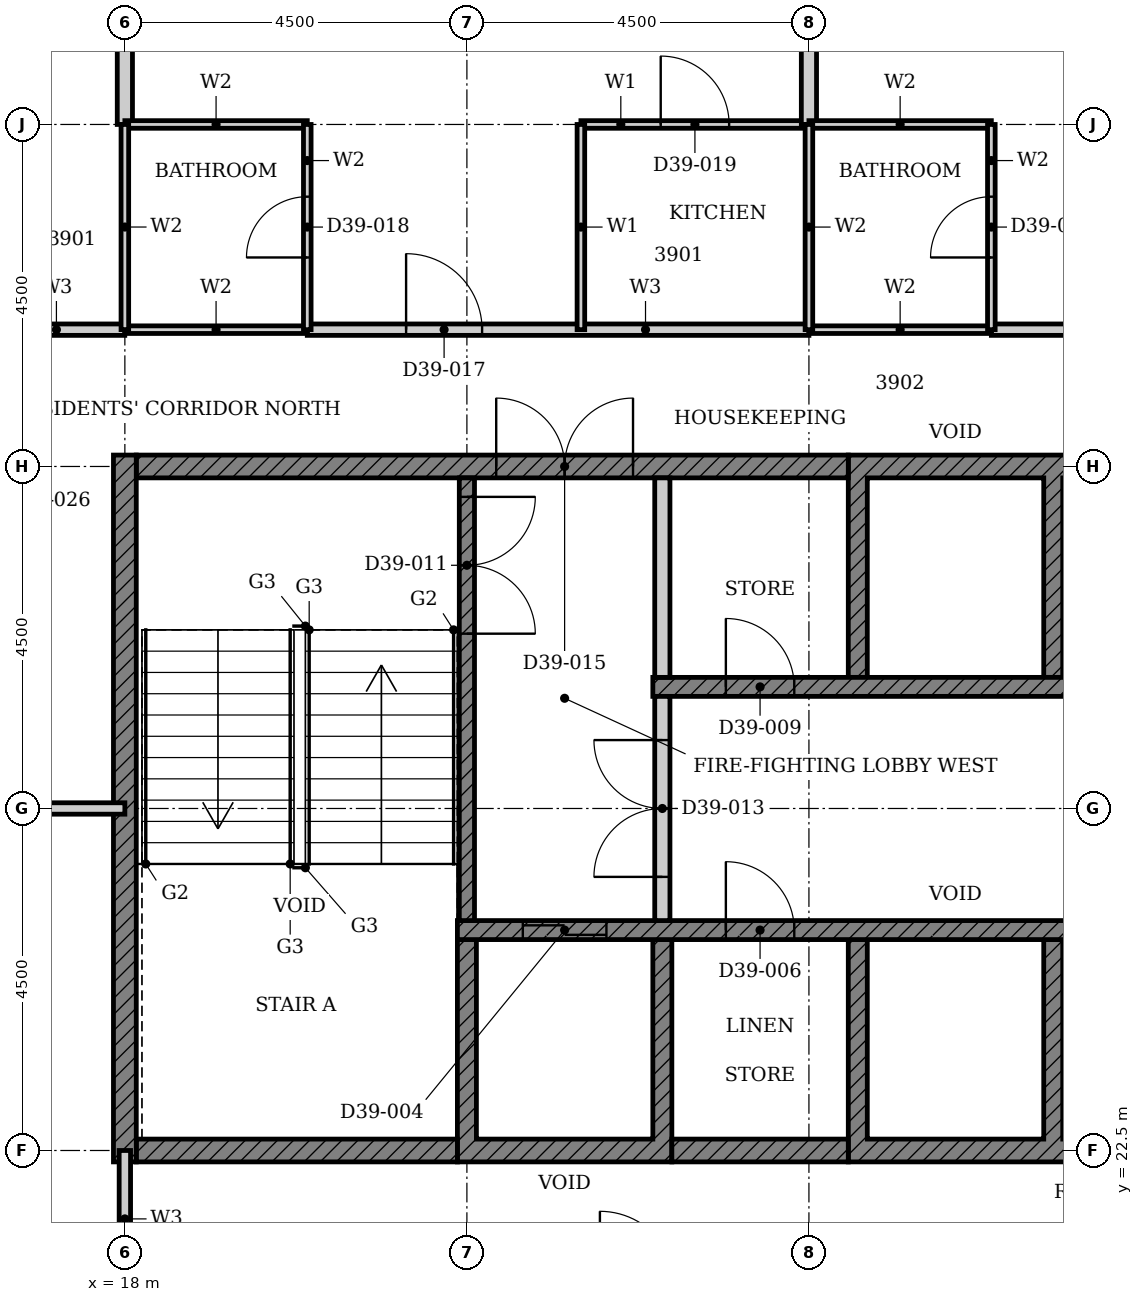
"""IFC4 building model, lengths in metres.
Left out: names, types, materials, properties, quantities, classifications, styles, units other than length and angle.
Written with IfcOpenShell. Run it as: python <this file> out.ifc"""

import sys

from ifc_helpers import new_model, si_unit, direction, frame, frame_2d, origin, place, context, subcontext, project, spatial, polyline, rectangle, outline, extrude, element, fill, save


model = new_model("IFC4")
c1 = context("Model", 3, precision=1e-05, world=origin(), true_north=direction((0.0, 1.0)))
c2 = subcontext(c1, "Body", "Model", "MODEL_VIEW")
j1 = project(units=[si_unit("LENGTHUNIT", "METRE"), si_unit("PLANEANGLEUNIT", "RADIAN")], contexts=[c1])
p1 = place(None, origin())
s1 = spatial("IfcSite", under=j1, at=p1, CompositionType="ELEMENT")
p2 = place(p1, origin())
s2 = spatial("IfcBuilding", under=s1, at=p2, CompositionType="ELEMENT")
p3 = place(p2, frame((0.0, 0.0, 158.0)))
s3 = spatial("IfcBuildingStorey", under=s2, at=p3, CompositionType="ELEMENT", Elevation=158.0)
p4 = place(p3, origin())
e1 = element("IfcWall", 1, at=p4, inside=s3, PredefinedType="SHEAR", context=c2, shape_type="SweptSolid", body=[
    extrude(outline(polyline([(22.375, 22.35), (25.197, 22.35), (25.197, 25.275), (24.947, 25.275), (24.947, 22.65), (22.625, 22.65), (22.625, 25.275), (22.375, 25.275), (22.375, 22.35)])), origin(), (0.0, 0.0, 1.0), 3.4),
])
p5 = place(p3, origin())
e2 = element("IfcWall", 2, at=p5, inside=s3, PredefinedType="SHEAR", context=c2, shape_type="SweptSolid", body=[
    extrude(outline(polyline([(27.518, 22.35), (32.911, 22.35), (32.911, 25.275), (32.661, 25.275), (32.661, 22.65), (30.339, 22.65), (30.339, 25.275), (30.089, 25.275), (30.089, 22.65), (27.768, 22.65), (27.768, 25.275), (27.518, 25.275), (27.518, 22.35)])), origin(), (0.0, 0.0, 1.0), 3.4),
])
p6 = place(p3, origin())
e3 = element("IfcWall", 3, at=p6, inside=s3, PredefinedType="SHEAR", context=c2, shape_type="SweptSolid", body=[
    extrude(outline(polyline([(27.518, 28.725), (27.768, 28.725), (27.768, 31.35), (30.089, 31.35), (30.089, 28.725), (30.339, 28.725), (30.339, 31.35), (32.661, 31.35), (32.661, 28.725), (32.911, 28.725), (32.911, 31.65), (27.518, 31.65), (27.518, 28.725)])), origin(), (0.0, 0.0, 1.0), 3.4),
])
p7 = place(p3, frame((18.15, 22.5, 0.0), z_axis=(0.0, 0.0, 1.0), x_axis=(1.0, 0.0, 0.0)))
e4 = element("IfcWall", 4, at=p7, inside=s3, PredefinedType="SHEAR", context=c2, shape_type="SweptSolid", body=[
    extrude(rectangle(XDim=4.225, YDim=0.3, at=frame_2d((2.113, 0.0))), origin(), (0.0, 0.0, 1.0), 3.4),
])
p8 = place(p3, frame((25.197, 22.5, 0.0), z_axis=(0.0, 0.0, 1.0), x_axis=(1.0, 0.0, 0.0)))
e5 = element("IfcWall", 5, at=p8, inside=s3, PredefinedType="SHEAR", context=c2, shape_type="SweptSolid", body=[
    extrude(rectangle(XDim=2.321, YDim=0.3, at=frame_2d((1.161, 0.0))), origin(), (0.0, 0.0, 1.0), 3.4),
])
p9 = place(p3, frame((18.15, 31.5, 0.0), z_axis=(0.0, 0.0, 1.0), x_axis=(1.0, 0.0, 0.0)))
e6 = element("IfcWall", 6, at=p9, inside=s3, PredefinedType="SHEAR", context=c2, shape_type="SweptSolid", body=[
    extrude(rectangle(XDim=9.368, YDim=0.3, at=frame_2d((4.684, 0.0))), origin(), (0.0, 0.0, 1.0), 3.4),
])
p10 = place(p9, frame((4.736, 0.0, 0.0)))
e7 = element("IfcOpeningElement", 7, at=p10, cuts=e6, PredefinedType="OPENING", context=c2, shape_type="SweptSolid", body=[
    extrude(rectangle(XDim=1.8, YDim=2.1, at=frame_2d((0.9, 1.05))), frame((0.0, 0.16, 0.0), z_axis=(0.0, -1.0, 0.0), x_axis=(1.0, 0.0, 0.0)), (0.0, 0.0, 1.0), 0.32),
])
p11 = place(p3, frame((18.0, 22.35, 0.0), z_axis=(0.0, 0.0, 1.0), x_axis=(0.0, 1.0, 0.0)))
e8 = element("IfcWall", 8, at=p11, inside=s3, PredefinedType="SHEAR", context=c2, shape_type="SweptSolid", body=[
    extrude(rectangle(XDim=9.3, YDim=0.3, at=frame_2d((4.65, 0.0))), origin(), (0.0, 0.0, 1.0), 3.4),
])
p12 = place(p3, frame((22.375, 25.4, 0.0), z_axis=(0.0, 0.0, 1.0), x_axis=(1.0, 0.0, 0.0)))
e9 = element("IfcWall", 9, at=p12, inside=s3, PredefinedType="SHEAR", context=c2, shape_type="SweptSolid", body=[
    extrude(rectangle(XDim=15.678, YDim=0.25, at=frame_2d((7.839, 0.0))), origin(), (0.0, 0.0, 1.0), 3.4),
])
p13 = place(p12, frame((8.575, 0.0, 0.0)))
e10 = element("IfcOpeningElement", 10, at=p13, cuts=e9, PredefinedType="OPENING", context=c2, shape_type="SweptSolid", body=[
    extrude(rectangle(XDim=1.1, YDim=2.1, at=frame_2d((0.55, 1.05))), frame((0.0, 0.135, 0.0), z_axis=(0.0, -1.0, 0.0), x_axis=(1.0, 0.0, 0.0)), (0.0, 0.0, 1.0), 0.27),
])
p14 = place(p12, frame((0.861, 0.0, 0.0)))
e11 = element("IfcOpeningElement", 11, at=p14, cuts=e9, PredefinedType="OPENING", context=c2, shape_type="SweptSolid", body=[
    extrude(rectangle(XDim=1.1, YDim=2.1, at=frame_2d((0.55, 1.05))), frame((0.0, 0.135, 0.0), z_axis=(0.0, -1.0, 0.0), x_axis=(1.0, 0.0, 0.0)), (0.0, 0.0, 1.0), 0.27),
])
p15 = place(p12, frame((3.532, 0.0, 0.0)))
e12 = element("IfcOpeningElement", 12, at=p15, cuts=e9, PredefinedType="OPENING", context=c2, shape_type="SweptSolid", body=[
    extrude(rectangle(XDim=0.9, YDim=2.1, at=frame_2d((0.45, 1.05))), frame((0.0, 0.135, 0.0), z_axis=(0.0, -1.0, 0.0), x_axis=(1.0, 0.0, 0.0)), (0.0, 0.0, 1.0), 0.27),
])
p16 = place(p12, frame((11.246, 0.0, 0.0)))
e13 = element("IfcOpeningElement", 13, at=p16, cuts=e9, PredefinedType="OPENING", context=c2, shape_type="SweptSolid", body=[
    extrude(rectangle(XDim=0.9, YDim=2.1, at=frame_2d((0.45, 1.05))), frame((0.0, 0.135, 0.0), z_axis=(0.0, -1.0, 0.0), x_axis=(1.0, 0.0, 0.0)), (0.0, 0.0, 1.0), 0.27),
])
p17 = place(p12, frame((13.818, 0.0, 0.0)))
e14 = element("IfcOpeningElement", 14, at=p17, cuts=e9, PredefinedType="OPENING", context=c2, shape_type="SweptSolid", body=[
    extrude(rectangle(XDim=0.9, YDim=2.1, at=frame_2d((0.45, 1.05))), frame((0.0, 0.135, 0.0), z_axis=(0.0, -1.0, 0.0), x_axis=(1.0, 0.0, 0.0)), (0.0, 0.0, 1.0), 0.27),
])
p18 = place(p3, frame((24.947, 28.6, 0.0), z_axis=(0.0, 0.0, 1.0), x_axis=(1.0, 0.0, 0.0)))
e15 = element("IfcWall", 15, at=p18, inside=s3, PredefinedType="SHEAR", context=c2, shape_type="SweptSolid", body=[
    extrude(rectangle(XDim=15.678, YDim=0.25, at=frame_2d((7.839, 0.0))), origin(), (0.0, 0.0, 1.0), 3.4),
])
p19 = place(p18, frame((6.004, 0.0, 0.0)))
e16 = element("IfcOpeningElement", 16, at=p19, cuts=e15, PredefinedType="OPENING", context=c2, shape_type="SweptSolid", body=[
    extrude(rectangle(XDim=1.1, YDim=2.1, at=frame_2d((0.55, 1.05))), frame((0.0, 0.135, 0.0), z_axis=(0.0, -1.0, 0.0), x_axis=(1.0, 0.0, 0.0)), (0.0, 0.0, 1.0), 0.27),
])
p20 = place(p18, frame((11.146, 0.0, 0.0)))
e17 = element("IfcOpeningElement", 17, at=p20, cuts=e15, PredefinedType="OPENING", context=c2, shape_type="SweptSolid", body=[
    extrude(rectangle(XDim=1.1, YDim=2.1, at=frame_2d((0.55, 1.05))), frame((0.0, 0.135, 0.0), z_axis=(0.0, -1.0, 0.0), x_axis=(1.0, 0.0, 0.0)), (0.0, 0.0, 1.0), 0.27),
])
p21 = place(p18, frame((13.718, 0.0, 0.0)))
e18 = element("IfcOpeningElement", 18, at=p21, cuts=e15, PredefinedType="OPENING", context=c2, shape_type="SweptSolid", body=[
    extrude(rectangle(XDim=1.1, YDim=2.1, at=frame_2d((0.55, 1.05))), frame((0.0, 0.135, 0.0), z_axis=(0.0, -1.0, 0.0), x_axis=(1.0, 0.0, 0.0)), (0.0, 0.0, 1.0), 0.27),
])
p22 = place(p18, frame((0.961, 0.0, 0.0)))
e19 = element("IfcOpeningElement", 19, at=p22, cuts=e15, PredefinedType="OPENING", context=c2, shape_type="SweptSolid", body=[
    extrude(rectangle(XDim=0.9, YDim=2.1, at=frame_2d((0.45, 1.05))), frame((0.0, 0.135, 0.0), z_axis=(0.0, -1.0, 0.0), x_axis=(1.0, 0.0, 0.0)), (0.0, 0.0, 1.0), 0.27),
])
p23 = place(p18, frame((8.675, 0.0, 0.0)))
e20 = element("IfcOpeningElement", 20, at=p23, cuts=e15, PredefinedType="OPENING", context=c2, shape_type="SweptSolid", body=[
    extrude(rectangle(XDim=0.9, YDim=2.1, at=frame_2d((0.45, 1.05))), frame((0.0, 0.135, 0.0), z_axis=(0.0, -1.0, 0.0), x_axis=(1.0, 0.0, 0.0)), (0.0, 0.0, 1.0), 0.27),
])
p24 = place(p3, frame((25.072, 28.725, 0.0), z_axis=(0.0, 0.0, 1.0), x_axis=(0.0, 1.0, 0.0)))
e21 = element("IfcWall", 21, at=p24, inside=s3, PredefinedType="PARTITIONING", context=c2, shape_type="SweptSolid", body=[
    extrude(rectangle(XDim=2.625, YDim=0.2, at=frame_2d((1.312, 0.0))), origin(), (0.0, 0.0, 1.0), 3.4),
])
p25 = place(p3, frame((22.5, 31.35, 0.0), z_axis=(0.0, 0.0, 1.0), x_axis=(0.0, -1.0, 0.0)))
e22 = element("IfcWall", 22, at=p25, inside=s3, PredefinedType="SHEAR", context=c2, shape_type="SweptSolid", body=[
    extrude(rectangle(XDim=5.825, YDim=0.2, at=frame_2d((2.913, 0.0))), origin(), (0.0, 0.0, 1.0), 3.4),
])
p26 = place(p25, frame((0.25, 0.0, 0.0)))
e23 = element("IfcOpeningElement", 23, at=p26, cuts=e22, PredefinedType="OPENING", context=c2, shape_type="SweptSolid", body=[
    extrude(rectangle(XDim=1.8, YDim=2.1, at=frame_2d((0.9, 1.05))), frame((0.0, 0.11, 0.0), z_axis=(0.0, -1.0, 0.0), x_axis=(1.0, 0.0, 0.0)), (0.0, 0.0, 1.0), 0.22),
])
p27 = place(p3, frame((25.072, 25.525, 0.0), z_axis=(0.0, 0.0, 1.0), x_axis=(0.0, 1.0, 0.0)))
e24 = element("IfcWall", 24, at=p27, inside=s3, PredefinedType="PARTITIONING", context=c2, shape_type="SweptSolid", body=[
    extrude(rectangle(XDim=2.95, YDim=0.2, at=frame_2d((1.475, 0.0))), origin(), (0.0, 0.0, 1.0), 3.4),
])
p28 = place(p27, frame((0.575, 0.0, 0.0)))
e25 = element("IfcOpeningElement", 25, at=p28, cuts=e24, PredefinedType="OPENING", context=c2, shape_type="SweptSolid", body=[
    extrude(rectangle(XDim=1.8, YDim=2.1, at=frame_2d((0.9, 1.05))), frame((0.0, 0.11, 0.0), z_axis=(0.0, -1.0, 0.0), x_axis=(1.0, 0.0, 0.0)), (0.0, 0.0, 1.0), 0.22),
])
p29 = place(p3, frame((4.5, 27.0, 0.0), z_axis=(0.0, 0.0, 1.0), x_axis=(1.0, 0.0, 0.0)))
e26 = element("IfcWall", 26, at=p29, inside=s3, PredefinedType="PARTITIONING", context=c2, shape_type="SweptSolid", body=[
    extrude(rectangle(XDim=13.5, YDim=0.15, at=frame_2d((6.75, 0.0))), origin(), (0.0, 0.0, 1.0), 2.68),
])
p30 = place(p29, frame((5.35, 0.0, 0.0)))
e27 = element("IfcOpeningElement", 27, at=p30, cuts=e26, PredefinedType="OPENING", context=c2, shape_type="SweptSolid", body=[
    extrude(rectangle(XDim=1.0, YDim=2.1, at=frame_2d((0.5, 1.05))), frame((0.0, 0.085, 0.0), z_axis=(0.0, -1.0, 0.0), x_axis=(1.0, 0.0, 0.0)), (0.0, 0.0, 1.0), 0.17),
])
p31 = place(p3, frame((20.4, 33.3, 0.0), z_axis=(0.0, 0.0, 1.0), x_axis=(1.0, 0.0, 0.0)))
e28 = element("IfcWall", 28, at=p31, inside=s3, PredefinedType="PARTITIONING", context=c2, shape_type="SweptSolid", body=[
    extrude(rectangle(XDim=6.6, YDim=0.15, at=frame_2d((3.3, 0.0))), origin(), (0.0, 0.0, 1.0), 3.4),
])
p32 = place(p31, frame((1.3, 0.0, 0.0)))
e29 = element("IfcOpeningElement", 29, at=p32, cuts=e28, PredefinedType="OPENING", context=c2, shape_type="SweptSolid", body=[
    extrude(rectangle(XDim=1.0, YDim=2.2, at=frame_2d((0.5, 1.1))), frame((0.0, 0.085, 0.0), z_axis=(0.0, -1.0, 0.0), x_axis=(1.0, 0.0, 0.0)), (0.0, 0.0, 1.0), 0.17),
])
p33 = place(p3, frame((29.4, 33.3, 0.0), z_axis=(0.0, 0.0, 1.0), x_axis=(1.0, 0.0, 0.0)))
e30 = element("IfcWall", 30, at=p33, inside=s3, PredefinedType="PARTITIONING", context=c2, shape_type="SweptSolid", body=[
    extrude(rectangle(XDim=6.6, YDim=0.15, at=frame_2d((3.3, 0.0))), origin(), (0.0, 0.0, 1.0), 3.4),
])
p34 = place(p33, frame((1.3, 0.0, 0.0)))
e31 = element("IfcOpeningElement", 31, at=p34, cuts=e30, PredefinedType="OPENING", context=c2, shape_type="SweptSolid", body=[
    extrude(rectangle(XDim=1.0, YDim=2.2, at=frame_2d((0.5, 1.1))), frame((0.0, 0.085, 0.0), z_axis=(0.0, -1.0, 0.0), x_axis=(1.0, 0.0, 0.0)), (0.0, 0.0, 1.0), 0.17),
])
p35 = place(p3, frame((16.2, 33.3, 0.0), z_axis=(0.0, 0.0, 1.0), x_axis=(1.0, 0.0, 0.0)))
e32 = element("IfcWall", 32, at=p35, inside=s3, PredefinedType="PARTITIONING", context=c2, shape_type="SweptSolid", body=[
    extrude(rectangle(XDim=1.799, YDim=0.15, at=frame_2d((0.899, 0.0))), origin(), (0.0, 0.0, 1.0), 3.4),
])
p36 = place(p3, frame((18.0, 20.7, 0.0), z_axis=(0.0, 0.0, 1.0), x_axis=(0.0, 1.0, 0.0)))
e33 = element("IfcWall", 33, at=p36, inside=s3, PredefinedType="PARTITIONING", context=c2, shape_type="SweptSolid", body=[
    extrude(rectangle(XDim=1.8, YDim=0.15, at=frame_2d((0.9, 0.0))), origin(), (0.0, 0.0, 1.0), 3.4),
])
p37 = place(p3, frame((24.0, 36.0, 0.0), z_axis=(0.0, 0.0, 1.0), x_axis=(1.0, 0.0, 0.0)))
e34 = element("IfcWall", 34, at=p37, inside=s3, PredefinedType="PARTITIONING", context=c2, shape_type="SweptSolid", body=[
    extrude(rectangle(XDim=3.0, YDim=0.1, at=frame_2d((1.5, 0.0))), origin(), (0.0, 0.0, 1.0), 3.4),
])
p38 = place(p37, frame((1.05, 0.0, 0.0)))
e35 = element("IfcOpeningElement", 35, at=p38, cuts=e34, PredefinedType="OPENING", context=c2, shape_type="SweptSolid", body=[
    extrude(rectangle(XDim=0.9, YDim=2.1, at=frame_2d((0.45, 1.05))), frame((0.0, 0.06, 0.0), z_axis=(0.0, -1.0, 0.0), x_axis=(1.0, 0.0, 0.0)), (0.0, 0.0, 1.0), 0.12),
])
p39 = place(p3, frame((24.0, 33.3, 0.0), z_axis=(0.0, 0.0, 1.0), x_axis=(0.0, 1.0, 0.0)))
e36 = element("IfcWall", 36, at=p39, inside=s3, PredefinedType="PARTITIONING", context=c2, shape_type="SweptSolid", body=[
    extrude(rectangle(XDim=2.7, YDim=0.1, at=frame_2d((1.35, 0.0))), origin(), (0.0, 0.0, 1.0), 3.4),
])
p40 = place(p3, frame((18.0, 36.0, 0.0), z_axis=(0.0, 0.0, 1.0), x_axis=(0.0, 1.0, 0.0)))
e37 = element("IfcWall", 37, at=p40, inside=s3, PredefinedType="PARTITIONING", context=c2, shape_type="SweptSolid", body=[
    extrude(rectangle(XDim=2.44, YDim=0.2, at=frame_2d((1.22, 0.0))), origin(), (0.0, 0.0, 1.0), 3.4),
])
p41 = place(p3, frame((27.0, 36.0, 0.0), z_axis=(0.0, 0.0, 1.0), x_axis=(0.0, 1.0, 0.0)))
e38 = element("IfcWall", 38, at=p41, inside=s3, PredefinedType="PARTITIONING", context=c2, shape_type="SweptSolid", body=[
    extrude(rectangle(XDim=4.69, YDim=0.2, at=frame_2d((2.345, 0.0))), origin(), (0.0, 0.0, 1.0), 3.4),
])
for number, where, z_axis, x_axis in (
    (39, (18.0, 33.3, 0.0), (0.0, 0.0, 1.0), (1.0, 0.0, 0.0)),
    (40, (27.0, 33.3, 0.0), (0.0, 0.0, 1.0), (1.0, 0.0, 0.0)),
    (41, (18.0, 36.0, 0.0), (0.0, 0.0, 1.0), (1.0, 0.0, 0.0)),
    (42, (27.0, 36.0, 0.0), (0.0, 0.0, 1.0), (1.0, 0.0, 0.0)),
):
    element("IfcWall", number, at=place(p3, frame(where, z_axis=z_axis, x_axis=x_axis)), inside=s3, PredefinedType="PARTITIONING", context=c2, shape_type="SweptSolid", body=[
        extrude(rectangle(XDim=2.4, YDim=0.1, at=frame_2d((1.2, 0.0))), origin(), (0.0, 0.0, 1.0), 3.4),
    ])
p42 = place(p3, frame((18.0, 33.301, 0.0), z_axis=(0.0, 0.0, 1.0), x_axis=(0.0, 1.0, 0.0)))
e43 = element("IfcWall", 43, at=p42, inside=s3, PredefinedType="PARTITIONING", context=c2, shape_type="SweptSolid", body=[
    extrude(rectangle(XDim=2.699, YDim=0.1, at=frame_2d((1.35, 0.0))), origin(), (0.0, 0.0, 1.0), 3.4),
])
p43 = place(p3, frame((20.4, 33.3, 0.0), z_axis=(0.0, 0.0, 1.0), x_axis=(0.0, 1.0, 0.0)))
e44 = element("IfcWall", 44, at=p43, inside=s3, PredefinedType="PARTITIONING", context=c2, shape_type="SweptSolid", body=[
    extrude(rectangle(XDim=2.7, YDim=0.1, at=frame_2d((1.35, 0.0))), origin(), (0.0, 0.0, 1.0), 3.4),
])
p44 = place(p43, frame((0.95, 0.0, 0.0)))
e45 = element("IfcOpeningElement", 45, at=p44, cuts=e44, PredefinedType="OPENING", context=c2, shape_type="SweptSolid", body=[
    extrude(rectangle(XDim=0.8, YDim=2.1, at=frame_2d((0.4, 1.05))), frame((0.0, 0.06, 0.0), z_axis=(0.0, -1.0, 0.0), x_axis=(1.0, 0.0, 0.0)), (0.0, 0.0, 1.0), 0.12),
])
p45 = place(p3, frame((27.0, 33.3, 0.0), z_axis=(0.0, 0.0, 1.0), x_axis=(0.0, 1.0, 0.0)))
e46 = element("IfcWall", 46, at=p45, inside=s3, PredefinedType="PARTITIONING", context=c2, shape_type="SweptSolid", body=[
    extrude(rectangle(XDim=2.7, YDim=0.1, at=frame_2d((1.35, 0.0))), origin(), (0.0, 0.0, 1.0), 3.4),
])
p46 = place(p3, frame((29.4, 33.3, 0.0), z_axis=(0.0, 0.0, 1.0), x_axis=(0.0, 1.0, 0.0)))
e47 = element("IfcWall", 47, at=p46, inside=s3, PredefinedType="PARTITIONING", context=c2, shape_type="SweptSolid", body=[
    extrude(rectangle(XDim=2.7, YDim=0.1, at=frame_2d((1.35, 0.0))), origin(), (0.0, 0.0, 1.0), 3.4),
])
p47 = place(p46, frame((0.95, 0.0, 0.0)))
e48 = element("IfcOpeningElement", 48, at=p47, cuts=e47, PredefinedType="OPENING", context=c2, shape_type="SweptSolid", body=[
    extrude(rectangle(XDim=0.8, YDim=2.1, at=frame_2d((0.4, 1.05))), frame((0.0, 0.06, 0.0), z_axis=(0.0, -1.0, 0.0), x_axis=(1.0, 0.0, 0.0)), (0.0, 0.0, 1.0), 0.12),
])
p48 = place(p14, origin())
e49 = element("IfcDoor", 49, at=p48, inside=s3, OperationType="DOUBLE_DOOR_SLIDING", PredefinedType="DOOR", context=c2, shape_type="SweptSolid", body=[
    extrude(rectangle(XDim=1.1, YDim=2.1, at=frame_2d((0.55, 1.05))), frame((0.0, 0.025, 0.0), z_axis=(0.0, -1.0, 0.0), x_axis=(1.0, 0.0, 0.0)), (0.0, 0.0, 1.0), 0.05),
])
fill(e11, e49)
p49 = place(p15, origin())
e50 = element("IfcDoor", 50, at=p49, inside=s3, OperationType="SINGLE_SWING_LEFT", PredefinedType="DOOR", context=c2, shape_type="SweptSolid", body=[
    extrude(rectangle(XDim=0.9, YDim=2.1, at=frame_2d((0.45, 1.05))), frame((0.0, 0.025, 0.0), z_axis=(0.0, -1.0, 0.0), x_axis=(1.0, 0.0, 0.0)), (0.0, 0.0, 1.0), 0.05),
])
fill(e12, e50)
p50 = place(p22, origin())
e51 = element("IfcDoor", 51, at=p50, inside=s3, OperationType="SINGLE_SWING_LEFT", PredefinedType="DOOR", context=c2, shape_type="SweptSolid", body=[
    extrude(rectangle(XDim=0.9, YDim=2.1, at=frame_2d((0.45, 1.05))), frame((0.0, 0.025, 0.0), z_axis=(0.0, -1.0, 0.0), x_axis=(1.0, 0.0, 0.0)), (0.0, 0.0, 1.0), 0.05),
])
fill(e19, e51)
p51 = place(p26, origin())
e52 = element("IfcDoor", 52, at=p51, inside=s3, OperationType="DOUBLE_DOOR_SINGLE_SWING", PredefinedType="DOOR", context=c2, shape_type="SweptSolid", body=[
    extrude(rectangle(XDim=1.8, YDim=2.1, at=frame_2d((0.9, 1.05))), frame((0.0, 0.025, 0.0), z_axis=(0.0, -1.0, 0.0), x_axis=(1.0, 0.0, 0.0)), (0.0, 0.0, 1.0), 0.05),
])
fill(e23, e52)
p52 = place(p28, origin())
e53 = element("IfcDoor", 53, at=p52, inside=s3, OperationType="DOUBLE_DOOR_SINGLE_SWING", PredefinedType="DOOR", context=c2, shape_type="SweptSolid", body=[
    extrude(rectangle(XDim=1.8, YDim=2.1, at=frame_2d((0.9, 1.05))), frame((0.0, 0.025, 0.0), z_axis=(0.0, -1.0, 0.0), x_axis=(1.0, 0.0, 0.0)), (0.0, 0.0, 1.0), 0.05),
])
fill(e25, e53)
p53 = place(p10, origin())
e54 = element("IfcDoor", 54, at=p53, inside=s3, OperationType="DOUBLE_DOOR_SINGLE_SWING", PredefinedType="DOOR", context=c2, shape_type="SweptSolid", body=[
    extrude(rectangle(XDim=1.8, YDim=2.1, at=frame_2d((0.9, 1.05))), frame((0.0, 0.025, 0.0), z_axis=(0.0, -1.0, 0.0), x_axis=(1.0, 0.0, 0.0)), (0.0, 0.0, 1.0), 0.05),
])
fill(e7, e54)
p54 = place(p32, origin())
e55 = element("IfcDoor", 55, at=p54, inside=s3, OperationType="SINGLE_SWING_LEFT", PredefinedType="DOOR", context=c2, shape_type="SweptSolid", body=[
    extrude(rectangle(XDim=1.0, YDim=2.2, at=frame_2d((0.5, 1.1))), frame((0.0, 0.025, 0.0), z_axis=(0.0, -1.0, 0.0), x_axis=(1.0, 0.0, 0.0)), (0.0, 0.0, 1.0), 0.05),
])
fill(e29, e55)
p55 = place(p44, origin())
e56 = element("IfcDoor", 56, at=p55, inside=s3, OperationType="SINGLE_SWING_LEFT", PredefinedType="DOOR", context=c2, shape_type="SweptSolid", body=[
    extrude(rectangle(XDim=0.8, YDim=2.1, at=frame_2d((0.4, 1.05))), frame((0.0, 0.025, 0.0), z_axis=(0.0, -1.0, 0.0), x_axis=(1.0, 0.0, 0.0)), (0.0, 0.0, 1.0), 0.05),
])
fill(e45, e56)
p56 = place(p38, origin())
e57 = element("IfcDoor", 57, at=p56, inside=s3, OperationType="SINGLE_SWING_LEFT", PredefinedType="DOOR", context=c2, shape_type="SweptSolid", body=[
    extrude(rectangle(XDim=0.9, YDim=2.1, at=frame_2d((0.45, 1.05))), frame((0.0, 0.025, 0.0), z_axis=(0.0, -1.0, 0.0), x_axis=(1.0, 0.0, 0.0)), (0.0, 0.0, 1.0), 0.05),
])
fill(e35, e57)
p57 = place(p47, origin())
e58 = element("IfcDoor", 58, at=p57, inside=s3, OperationType="SINGLE_SWING_RIGHT", PredefinedType="DOOR", context=c2, shape_type="SweptSolid", body=[
    extrude(rectangle(XDim=0.8, YDim=2.1, at=frame_2d((0.4, 1.05))), frame((0.0, 0.025, 0.0), z_axis=(0.0, -1.0, 0.0), x_axis=(1.0, 0.0, 0.0)), (0.0, 0.0, 1.0), 0.05),
])
fill(e48, e58)
save(model, sys.argv[1])
